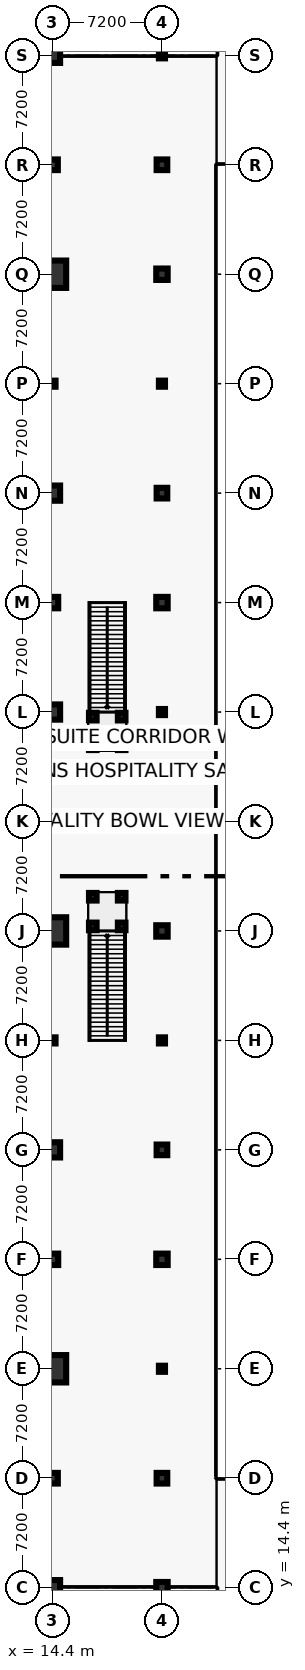
"""IFC4 building model, lengths in metres.
Left out: names, types, materials, properties, quantities, classifications, styles, units other than length and angle.
Written with IfcOpenShell. Run it as: python <this file> out.ifc"""

import sys

from ifc_helpers import new_model, si_unit, direction, frame, origin, origin_2d, place, context, subcontext, project, spatial, rectangle, hollow_rectangle, circle, extrude, element, save


model = new_model("IFC4")
c1 = context("Model", 3, precision=1e-05, world=origin(), true_north=direction((0.0, 1.0)))
c2 = subcontext(c1, "Body", "Model", "MODEL_VIEW")
j1 = project(units=[si_unit("LENGTHUNIT", "METRE"), si_unit("PLANEANGLEUNIT", "RADIAN")], contexts=[c1])
p1 = place(None, origin())
s1 = spatial("IfcSite", under=j1, at=p1, CompositionType="ELEMENT")
p2 = place(p1, origin())
s2 = spatial("IfcBuilding", under=s1, at=p2, CompositionType="ELEMENT")
p3 = place(p2, frame((0.0, 0.0, 9.6)))
s3 = spatial("IfcBuildingStorey", under=s2, at=p3, CompositionType="ELEMENT", Elevation=9.6)
p4 = place(p3, frame((14.4, 14.4, 0.0), z_axis=(0.0, 0.0, 1.0), x_axis=(1.0, 0.0, 0.0)))
e1 = element("IfcColumn", 1, at=p4, inside=s3, PredefinedType="COLUMN", context=c2, shape_type="SweptSolid", body=[
    extrude(circle(Radius=0.5, at=origin_2d()), origin(), (0.0, 0.0, 1.0), 4.2),
])
p5 = place(p3, frame((14.4, 21.6, 0.0), z_axis=(0.0, 0.0, 1.0), x_axis=(1.0, 0.0, 0.0)))
e2 = element("IfcColumn", 2, at=p5, inside=s3, PredefinedType="COLUMN", context=c2, shape_type="SweptSolid", body=[
    extrude(rectangle(XDim=0.7, YDim=0.7, at=origin_2d()), origin(), (0.0, 0.0, 1.0), 4.2),
])
p6 = place(p3, frame((14.4, 28.8, 0.0), z_axis=(0.0, 0.0, 1.0), x_axis=(1.0, 0.0, 0.0)))
e3 = element("IfcColumn", 3, at=p6, inside=s3, PredefinedType="COLUMN", context=c2, shape_type="SweptSolid", body=[
    extrude(circle(Radius=0.9, at=origin_2d()), origin(), (0.0, 0.0, 1.0), 4.2),
])
p7 = place(p3, frame((14.4, 36.0, 0.0), z_axis=(0.0, 0.0, 1.0), x_axis=(1.0, 0.0, 0.0)))
e4 = element("IfcColumn", 4, at=p7, inside=s3, PredefinedType="COLUMN", context=c2, shape_type="SweptSolid", body=[
    extrude(rectangle(XDim=0.75, YDim=0.75, at=origin_2d()), origin(), (0.0, 0.0, 1.0), 4.2),
])
p8 = place(p3, frame((14.4, 43.2, 0.0), z_axis=(0.0, 0.0, 1.0), x_axis=(1.0, 0.0, 0.0)))
e5 = element("IfcColumn", 5, at=p8, inside=s3, PredefinedType="COLUMN", context=c2, shape_type="SweptSolid", body=[
    extrude(circle(Radius=0.5, at=origin_2d()), origin(), (0.0, 0.0, 1.0), 4.2),
])
p9 = place(p3, frame((14.4, 50.4, 0.0), z_axis=(0.0, 0.0, 1.0), x_axis=(1.0, 0.0, 0.0)))
e6 = element("IfcColumn", 6, at=p9, inside=s3, PredefinedType="COLUMN", context=c2, shape_type="SweptSolid", body=[
    extrude(hollow_rectangle(XDim=0.4, YDim=0.4, WallThickness=0.02, at=origin_2d()), origin(), (0.0, 0.0, 1.0), 4.2),
])
p10 = place(p3, frame((14.4, 57.6, 0.0), z_axis=(0.0, 0.0, 1.0), x_axis=(1.0, 0.0, 0.0)))
e7 = element("IfcColumn", 7, at=p10, inside=s3, PredefinedType="COLUMN", context=c2, shape_type="SweptSolid", body=[
    extrude(circle(Radius=0.9, at=origin_2d()), origin(), (0.0, 0.0, 1.0), 4.2),
])
p11 = place(p3, frame((14.4, 64.8, 0.0), z_axis=(0.0, 0.0, 1.0), x_axis=(1.0, 0.0, 0.0)))
e8 = element("IfcColumn", 8, at=p11, inside=s3, PredefinedType="COLUMN", context=c2, shape_type="SweptSolid", body=[
    extrude(rectangle(XDim=0.7, YDim=0.7, at=origin_2d()), origin(), (0.0, 0.0, 1.0), 4.2),
])
p12 = place(p3, frame((14.4, 72.0, 0.0), z_axis=(0.0, 0.0, 1.0), x_axis=(1.0, 0.0, 0.0)))
e9 = element("IfcColumn", 9, at=p12, inside=s3, PredefinedType="COLUMN", context=c2, shape_type="SweptSolid", body=[
    extrude(circle(Radius=0.5, at=origin_2d()), origin(), (0.0, 0.0, 1.0), 4.2),
])
p13 = place(p3, frame((14.4, 79.2, 0.0), z_axis=(0.0, 0.0, 1.0), x_axis=(1.0, 0.0, 0.0)))
e10 = element("IfcColumn", 10, at=p13, inside=s3, PredefinedType="COLUMN", context=c2, shape_type="SweptSolid", body=[
    extrude(rectangle(XDim=0.75, YDim=0.75, at=origin_2d()), origin(), (0.0, 0.0, 1.0), 4.2),
])
p14 = place(p3, frame((14.4, 86.4, 0.0), z_axis=(0.0, 0.0, 1.0), x_axis=(1.0, 0.0, 0.0)))
e11 = element("IfcColumn", 11, at=p14, inside=s3, PredefinedType="COLUMN", context=c2, shape_type="SweptSolid", body=[
    extrude(circle(Radius=0.5, at=origin_2d()), origin(), (0.0, 0.0, 1.0), 4.2),
])
p15 = place(p3, frame((14.4, 93.6, 0.0), z_axis=(0.0, 0.0, 1.0), x_axis=(1.0, 0.0, 0.0)))
e12 = element("IfcColumn", 12, at=p15, inside=s3, PredefinedType="COLUMN", context=c2, shape_type="SweptSolid", body=[
    extrude(hollow_rectangle(XDim=0.4, YDim=0.4, WallThickness=0.02, at=origin_2d()), origin(), (0.0, 0.0, 1.0), 4.2),
])
p16 = place(p3, frame((14.4, 100.8, 0.0), z_axis=(0.0, 0.0, 1.0), x_axis=(1.0, 0.0, 0.0)))
e13 = element("IfcColumn", 13, at=p16, inside=s3, PredefinedType="COLUMN", context=c2, shape_type="SweptSolid", body=[
    extrude(circle(Radius=0.9, at=origin_2d()), origin(), (0.0, 0.0, 1.0), 4.2),
])
p17 = place(p3, frame((14.4, 108.0, 0.0), z_axis=(0.0, 0.0, 1.0), x_axis=(1.0, 0.0, 0.0)))
e14 = element("IfcColumn", 14, at=p17, inside=s3, PredefinedType="COLUMN", context=c2, shape_type="SweptSolid", body=[
    extrude(rectangle(XDim=0.7, YDim=0.7, at=origin_2d()), origin(), (0.0, 0.0, 1.0), 4.2),
])
p18 = place(p3, frame((14.4, 115.2, 0.0), z_axis=(0.0, 0.0, 1.0), x_axis=(1.0, 0.0, 0.0)))
e15 = element("IfcColumn", 15, at=p18, inside=s3, PredefinedType="COLUMN", context=c2, shape_type="SweptSolid", body=[
    extrude(circle(Radius=0.5, at=origin_2d()), origin(), (0.0, 0.0, 1.0), 4.2),
])
p19 = place(p3, frame((21.6, 14.4, 0.0), z_axis=(0.0, 0.0, 1.0), x_axis=(1.0, 0.0, 0.0)))
e16 = element("IfcColumn", 16, at=p19, inside=s3, PredefinedType="COLUMN", context=c2, shape_type="SweptSolid", body=[
    extrude(rectangle(XDim=0.75, YDim=0.75, at=origin_2d()), origin(), (0.0, 0.0, 1.0), 4.2),
])
p20 = place(p3, frame((21.6, 21.6, 0.0), z_axis=(0.0, 0.0, 1.0), x_axis=(1.0, 0.0, 0.0)))
e17 = element("IfcColumn", 17, at=p20, inside=s3, PredefinedType="COLUMN", context=c2, shape_type="SweptSolid", body=[
    extrude(rectangle(XDim=0.7, YDim=0.7, at=origin_2d()), origin(), (0.0, 0.0, 1.0), 4.2),
])
p21 = place(p3, frame((21.6, 28.8, 0.0), z_axis=(0.0, 0.0, 1.0), x_axis=(1.0, 0.0, 0.0)))
e18 = element("IfcColumn", 18, at=p21, inside=s3, PredefinedType="COLUMN", context=c2, shape_type="SweptSolid", body=[
    extrude(hollow_rectangle(XDim=0.4, YDim=0.4, WallThickness=0.02, at=origin_2d()), origin(), (0.0, 0.0, 1.0), 4.2),
])
p22 = place(p3, frame((21.6, 36.0, 0.0), z_axis=(0.0, 0.0, 1.0), x_axis=(1.0, 0.0, 0.0)))
e19 = element("IfcColumn", 19, at=p22, inside=s3, PredefinedType="COLUMN", context=c2, shape_type="SweptSolid", body=[
    extrude(rectangle(XDim=0.75, YDim=0.75, at=origin_2d()), origin(), (0.0, 0.0, 1.0), 4.2),
])
p23 = place(p3, frame((21.6, 43.2, 0.0), z_axis=(0.0, 0.0, 1.0), x_axis=(1.0, 0.0, 0.0)))
e20 = element("IfcColumn", 20, at=p23, inside=s3, PredefinedType="COLUMN", context=c2, shape_type="SweptSolid", body=[
    extrude(rectangle(XDim=0.7, YDim=0.7, at=origin_2d()), origin(), (0.0, 0.0, 1.0), 4.2),
])
p24 = place(p3, frame((21.6, 50.4, 0.0), z_axis=(0.0, 0.0, 1.0), x_axis=(1.0, 0.0, 0.0)))
e21 = element("IfcColumn", 21, at=p24, inside=s3, PredefinedType="COLUMN", context=c2, shape_type="SweptSolid", body=[
    extrude(hollow_rectangle(XDim=0.4, YDim=0.4, WallThickness=0.02, at=origin_2d()), origin(), (0.0, 0.0, 1.0), 4.2),
])
p25 = place(p3, frame((21.6, 57.6, 0.0), z_axis=(0.0, 0.0, 1.0), x_axis=(1.0, 0.0, 0.0)))
e22 = element("IfcColumn", 22, at=p25, inside=s3, PredefinedType="COLUMN", context=c2, shape_type="SweptSolid", body=[
    extrude(rectangle(XDim=0.75, YDim=0.75, at=origin_2d()), origin(), (0.0, 0.0, 1.0), 4.2),
])
p26 = place(p3, frame((21.6, 64.8, 0.0), z_axis=(0.0, 0.0, 1.0), x_axis=(1.0, 0.0, 0.0)))
e23 = element("IfcColumn", 23, at=p26, inside=s3, PredefinedType="COLUMN", context=c2, shape_type="SweptSolid", body=[
    extrude(rectangle(XDim=0.7, YDim=0.7, at=origin_2d()), origin(), (0.0, 0.0, 1.0), 4.2),
])
p27 = place(p3, frame((21.6, 72.0, 0.0), z_axis=(0.0, 0.0, 1.0), x_axis=(1.0, 0.0, 0.0)))
e24 = element("IfcColumn", 24, at=p27, inside=s3, PredefinedType="COLUMN", context=c2, shape_type="SweptSolid", body=[
    extrude(hollow_rectangle(XDim=0.4, YDim=0.4, WallThickness=0.02, at=origin_2d()), origin(), (0.0, 0.0, 1.0), 4.2),
])
p28 = place(p3, frame((21.6, 79.2, 0.0), z_axis=(0.0, 0.0, 1.0), x_axis=(1.0, 0.0, 0.0)))
e25 = element("IfcColumn", 25, at=p28, inside=s3, PredefinedType="COLUMN", context=c2, shape_type="SweptSolid", body=[
    extrude(rectangle(XDim=0.75, YDim=0.75, at=origin_2d()), origin(), (0.0, 0.0, 1.0), 4.2),
])
p29 = place(p3, frame((21.6, 86.4, 0.0), z_axis=(0.0, 0.0, 1.0), x_axis=(1.0, 0.0, 0.0)))
e26 = element("IfcColumn", 26, at=p29, inside=s3, PredefinedType="COLUMN", context=c2, shape_type="SweptSolid", body=[
    extrude(rectangle(XDim=0.7, YDim=0.7, at=origin_2d()), origin(), (0.0, 0.0, 1.0), 4.2),
])
p30 = place(p3, frame((21.6, 93.6, 0.0), z_axis=(0.0, 0.0, 1.0), x_axis=(1.0, 0.0, 0.0)))
e27 = element("IfcColumn", 27, at=p30, inside=s3, PredefinedType="COLUMN", context=c2, shape_type="SweptSolid", body=[
    extrude(hollow_rectangle(XDim=0.4, YDim=0.4, WallThickness=0.02, at=origin_2d()), origin(), (0.0, 0.0, 1.0), 4.2),
])
p31 = place(p3, frame((21.6, 100.8, 0.0), z_axis=(0.0, 0.0, 1.0), x_axis=(1.0, 0.0, 0.0)))
e28 = element("IfcColumn", 28, at=p31, inside=s3, PredefinedType="COLUMN", context=c2, shape_type="SweptSolid", body=[
    extrude(rectangle(XDim=0.75, YDim=0.75, at=origin_2d()), origin(), (0.0, 0.0, 1.0), 4.2),
])
p32 = place(p3, frame((21.6, 108.0, 0.0), z_axis=(0.0, 0.0, 1.0), x_axis=(1.0, 0.0, 0.0)))
e29 = element("IfcColumn", 29, at=p32, inside=s3, PredefinedType="COLUMN", context=c2, shape_type="SweptSolid", body=[
    extrude(rectangle(XDim=0.7, YDim=0.7, at=origin_2d()), origin(), (0.0, 0.0, 1.0), 4.2),
])
p33 = place(p3, frame((21.6, 115.2, 0.0), z_axis=(0.0, 0.0, 1.0), x_axis=(1.0, 0.0, 0.0)))
e30 = element("IfcColumn", 30, at=p33, inside=s3, PredefinedType="COLUMN", context=c2, shape_type="SweptSolid", body=[
    extrude(hollow_rectangle(XDim=0.4, YDim=0.4, WallThickness=0.02, at=origin_2d()), origin(), (0.0, 0.0, 1.0), 4.2),
])
for number, where, z_axis, x_axis in (
    (31, (17.05, 57.9, 0.0), (0.0, 0.0, 1.0), (1.0, 0.0, 0.0)),
    (32, (18.95, 57.9, 0.0), (0.0, 0.0, 1.0), (1.0, 0.0, 0.0)),
    (33, (17.05, 59.85, 0.0), (0.0, 0.0, 1.0), (1.0, 0.0, 0.0)),
    (34, (18.95, 59.85, 0.0), (0.0, 0.0, 1.0), (1.0, 0.0, 0.0)),
    (35, (17.05, 69.75, 0.0), (0.0, 0.0, 1.0), (1.0, 0.0, 0.0)),
    (36, (18.95, 69.75, 0.0), (0.0, 0.0, 1.0), (1.0, 0.0, 0.0)),
    (37, (17.05, 71.7, 0.0), (0.0, 0.0, 1.0), (1.0, 0.0, 0.0)),
    (38, (18.95, 71.7, 0.0), (0.0, 0.0, 1.0), (1.0, 0.0, 0.0)),
):
    element("IfcColumn", number, at=place(p3, frame(where, z_axis=z_axis, x_axis=x_axis)), inside=s3, PredefinedType="COLUMN", context=c2, shape_type="SweptSolid", body=[
        extrude(rectangle(XDim=0.5, YDim=0.5, at=origin_2d()), origin(), (0.0, 0.0, 1.0), 3.96),
    ])
save(model, sys.argv[1])
